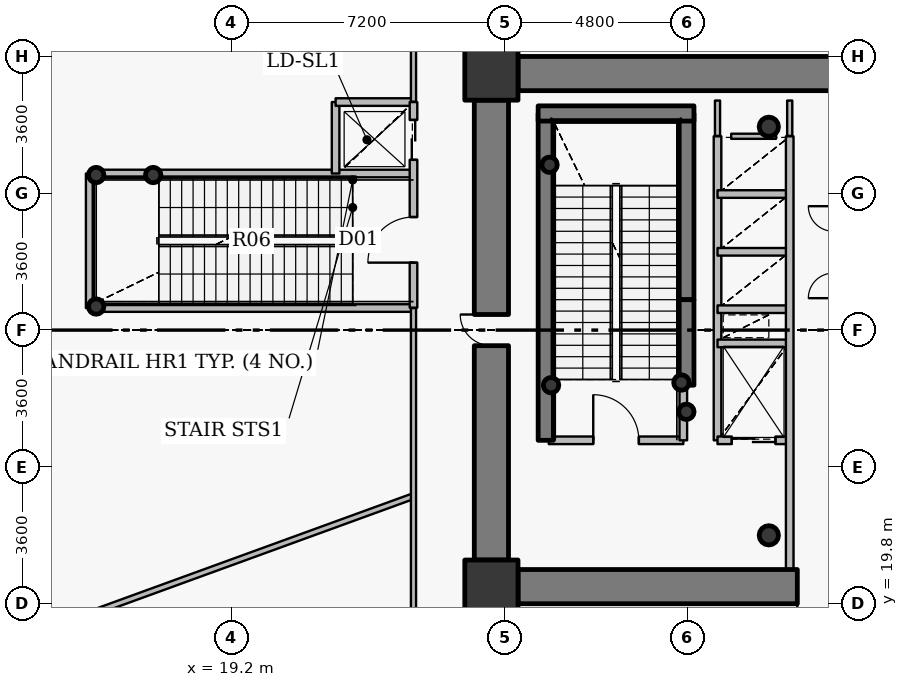
"""IFC4 building model, lengths in metres.
Left out: names, types, materials, properties, quantities, classifications, styles, units other than length and angle.
Written with IfcOpenShell. Run it as: python <this file> out.ifc"""

import sys

from ifc_helpers import new_model, si_unit, direction, frame, frame_2d, origin, origin_2d, place, context, subcontext, project, spatial, rectangle, hollow_circle, extrude, source, transform, mapped, element, fill, save


model = new_model("IFC4")
c1 = context("Model", 3, precision=1e-05, world=origin(), true_north=direction((0.0, 1.0)))
c2 = subcontext(c1, "Body", "Model", "MODEL_VIEW")
j1 = project(units=[si_unit("LENGTHUNIT", "METRE"), si_unit("PLANEANGLEUNIT", "RADIAN")], contexts=[c1])
p1 = place(None, origin())
s1 = spatial("IfcSite", under=j1, at=p1, CompositionType="ELEMENT")
p2 = place(p1, origin())
s2 = spatial("IfcBuilding", under=s1, at=p2, CompositionType="ELEMENT")
p3 = place(p2, frame((0.0, 0.0, 27.0)))
s3 = spatial("IfcBuildingStorey", under=s2, at=p3, CompositionType="ELEMENT", Elevation=27.0)
for number, where, z_axis, x_axis in (
    (1, (26.05, 20.25, 0.0), (0.0, 0.0, 1.0), (1.0, 0.0, 0.0)),
    (2, (26.05, 33.75, 0.0), (0.0, 0.0, 1.0), (1.0, 0.0, 0.0)),
):
    element("IfcColumn", number, at=place(p3, frame(where, z_axis=z_axis, x_axis=x_axis)), inside=s3, PredefinedType="COLUMN", context=c2, shape_type="SweptSolid", body=[
        extrude(rectangle(XDim=1.4, YDim=1.4, at=origin_2d()), origin(), (0.0, 0.0, 1.0), 5.4),
    ])
for number, where, z_axis, x_axis in (
    (3, (33.35, 21.6, 0.0), (0.0, 0.0, 1.0), (1.0, 0.0, 0.0)),
    (4, (33.35, 32.35, 0.0), (0.0, 0.0, 1.0), (1.0, 0.0, 0.0)),
):
    element("IfcColumn", number, at=place(p3, frame(where, z_axis=z_axis, x_axis=x_axis)), inside=s3, PredefinedType="COLUMN", context=c2, shape_type="SweptSolid", body=[
        extrude(hollow_circle(Radius=0.254, WallThickness=0.02, at=origin_2d()), origin(), (0.0, 0.0, 1.0), 5.4),
    ])
p4 = place(p3, frame((27.48, 24.1, 0.0), z_axis=(0.0, 0.0, 1.0), x_axis=(0.0, 1.0, 0.0)))
e5 = element("IfcWall", 5, at=p4, inside=s3, PredefinedType="SHEAR", context=c2, shape_type="SweptSolid", body=[
    extrude(rectangle(XDim=8.6, YDim=0.4, at=frame_2d((4.3, 0.0))), origin(), (0.0, 0.0, 1.0), 5.4),
])
p5 = place(p3, frame((31.18, 27.8, 0.0), z_axis=(0.0, 0.0, 1.0), x_axis=(0.0, 1.0, 0.0)))
e6 = element("IfcWall", 6, at=p5, inside=s3, PredefinedType="SHEAR", context=c2, shape_type="SweptSolid", body=[
    extrude(rectangle(XDim=4.9, YDim=0.4, at=frame_2d((2.45, 0.0))), origin(), (0.0, 0.0, 1.0), 5.4),
])
p6 = place(p3, frame((27.28, 32.7, 0.0), z_axis=(0.0, 0.0, 1.0), x_axis=(1.0, 0.0, 0.0)))
e7 = element("IfcWall", 7, at=p6, inside=s3, PredefinedType="SHEAR", context=c2, shape_type="SweptSolid", body=[
    extrude(rectangle(XDim=4.1, YDim=0.4, at=frame_2d((2.05, 0.0))), origin(), (0.0, 0.0, 1.0), 5.4),
])
for number, where, z_axis, x_axis in (
    (8, (27.58, 31.35, 0.0), (0.0, 0.0, 1.0), (1.0, 0.0, 0.0)),
    (9, (31.05, 25.62, 0.0), (0.0, 0.0, 1.0), (1.0, 0.0, 0.0)),
    (10, (31.18, 24.85, 0.0), (0.0, 0.0, 1.0), (1.0, 0.0, 0.0)),
    (11, (27.62, 25.55, 0.0), (0.0, 0.0, 1.0), (1.0, 0.0, 0.0)),
    (12, (15.65, 27.62, 0.0), (0.0, 0.0, 1.0), (1.0, 0.0, 0.0)),
    (13, (15.65, 31.08, 0.0), (0.0, 0.0, 1.0), (1.0, 0.0, 0.0)),
    (14, (17.15, 31.08, 0.0), (0.0, 0.0, 1.0), (1.0, 0.0, 0.0)),
):
    element("IfcColumn", number, at=place(p3, frame(where, z_axis=z_axis, x_axis=x_axis)), inside=s3, PredefinedType="COLUMN", context=c2, shape_type="SweptSolid", body=[
        extrude(hollow_circle(Radius=0.203, WallThickness=0.016, at=origin_2d()), origin(), (0.0, 0.0, 1.0), 5.4),
    ])
p7 = place(p3, frame((26.75, 33.75, 0.0), z_axis=(0.0, 0.0, 1.0), x_axis=(1.0, 0.0, 0.0)))
e15 = element("IfcWall", 15, at=p7, inside=s3, PredefinedType="SHEAR", context=c2, shape_type="SweptSolid", body=[
    extrude(rectangle(XDim=18.5, YDim=0.9, at=frame_2d((9.25, 0.0))), origin(), (0.0, 0.0, 1.0), 4.6),
])
p8 = place(p3, frame((45.25, 20.25, 0.0), z_axis=(0.0, 0.0, 1.0), x_axis=(-1.0, 0.0, 0.0)))
e16 = element("IfcWall", 16, at=p8, inside=s3, PredefinedType="SHEAR", context=c2, shape_type="SweptSolid", body=[
    extrude(rectangle(XDim=18.5, YDim=0.9, at=frame_2d((9.25, 0.0))), origin(), (0.0, 0.0, 1.0), 4.6),
])
p9 = place(p8, frame((10.0, 0.0, 0.0)))
e17 = element("IfcOpeningElement", 17, at=p9, cuts=e16, PredefinedType="OPENING", context=c2, shape_type="SweptSolid", body=[
    extrude(rectangle(XDim=1.15, YDim=2.15, at=origin_2d()), frame((0.575, 0.46, 1.075), z_axis=(0.0, -1.0, 0.0), x_axis=(1.0, 0.0, 0.0)), (0.0, 0.0, 1.0), 0.92),
])
p10 = place(p3, frame((26.05, 20.95, 0.0), z_axis=(0.0, 0.0, 1.0), x_axis=(0.0, 1.0, 0.0)))
e18 = element("IfcWall", 18, at=p10, inside=s3, PredefinedType="SHEAR", context=c2, shape_type="SweptSolid", body=[
    extrude(rectangle(XDim=12.1, YDim=0.9, at=frame_2d((6.05, 0.0))), origin(), (0.0, 0.0, 1.0), 4.6),
])
p11 = place(p10, frame((5.64, 0.0, 0.0)))
e19 = element("IfcOpeningElement", 19, at=p11, cuts=e18, PredefinedType="OPENING", context=c2, shape_type="SweptSolid", body=[
    extrude(rectangle(XDim=0.82, YDim=2.1, at=origin_2d()), frame((0.41, 0.46, 1.05), z_axis=(0.0, -1.0, 0.0), x_axis=(1.0, 0.0, 0.0)), (0.0, 0.0, 1.0), 0.92),
])
p12 = place(p3, frame((31.18, 25.55, 0.0), z_axis=(0.0, 0.0, 1.0), x_axis=(0.0, 1.0, 0.0)))
e20 = element("IfcWall", 20, at=p12, inside=s3, PredefinedType="SHEAR", context=c2, shape_type="SweptSolid", body=[
    extrude(rectangle(XDim=2.25, YDim=0.4, at=frame_2d((1.125, 0.0))), origin(), (0.0, 0.0, 1.0), 4.75),
])
p13 = place(p3, frame((13.753, 18.903, 0.0), z_axis=(0.0, 0.0, 1.0), x_axis=(0.939694021803, 0.342016294038, 0.0)))
e21 = element("IfcWall", 21, at=p13, inside=s3, PredefinedType="PARTITIONING", context=c2, shape_type="SweptSolid", body=[
    extrude(rectangle(XDim=10.905, YDim=0.15, at=frame_2d((5.452, 0.0))), origin(), (0.0, 0.0, 1.0), 5.15),
])
p14 = place(p3, frame((15.48, 27.58, 0.0), z_axis=(0.0, 0.0, 1.0), x_axis=(0.0, 1.0, 0.0)))
e22 = element("IfcWall", 22, at=p14, inside=s3, PredefinedType="PARTITIONING", context=c2, shape_type="SweptSolid", body=[
    extrude(rectangle(XDim=3.54, YDim=0.2, at=frame_2d((1.77, 0.0))), origin(), (0.0, 0.0, 1.0), 5.15),
])
for number, where, z_axis, x_axis in (
    (23, (15.48, 27.58, 0.0), (0.0, 0.0, 1.0), (1.0, 0.0, 0.0)),
    (24, (15.48, 31.12, 0.0), (0.0, 0.0, 1.0), (1.0, 0.0, 0.0)),
):
    element("IfcWall", number, at=place(p3, frame(where, z_axis=z_axis, x_axis=x_axis)), inside=s3, PredefinedType="PARTITIONING", context=c2, shape_type="SweptSolid", body=[
        extrude(rectangle(XDim=8.52, YDim=0.2, at=frame_2d((4.26, 0.0))), origin(), (0.0, 0.0, 1.0), 5.15),
    ])
p15 = place(p3, frame((21.95, 31.12, 0.0), z_axis=(0.0, 0.0, 1.0), x_axis=(0.0, 1.0, 0.0)))
e25 = element("IfcWall", 25, at=p15, inside=s3, PredefinedType="PARTITIONING", context=c2, shape_type="SweptSolid", body=[
    extrude(rectangle(XDim=1.88, YDim=0.2, at=frame_2d((0.94, 0.0))), origin(), (0.0, 0.0, 1.0), 3.185),
])
p16 = place(p3, frame((21.95, 33.0, 0.0), z_axis=(0.0, 0.0, 1.0), x_axis=(1.0, 0.0, 0.0)))
e26 = element("IfcWall", 26, at=p16, inside=s3, PredefinedType="PARTITIONING", context=c2, shape_type="SweptSolid", body=[
    extrude(rectangle(XDim=2.05, YDim=0.2, at=frame_2d((1.025, 0.0))), origin(), (0.0, 0.0, 1.0), 5.15),
])
p17 = place(p3, frame((24.0, 14.8, 0.0), z_axis=(0.0, 0.0, 1.0), x_axis=(0.0, 1.0, 0.0)))
e27 = element("IfcWall", 27, at=p17, inside=s3, PredefinedType="PARTITIONING", context=c2, shape_type="SweptSolid", body=[
    extrude(rectangle(XDim=12.78, YDim=0.135, at=frame_2d((6.39, 0.0))), origin(), (0.0, 0.0, 1.0), 3.185),
])
p18 = place(p17, frame((3.411, 0.0, 0.0)))
e28 = element("IfcOpeningElement", 28, at=p18, cuts=e27, PredefinedType="OPENING", context=c2, shape_type="SweptSolid", body=[
    extrude(rectangle(XDim=1.05, YDim=2.15, at=origin_2d()), frame((0.525, 0.078, 1.075), z_axis=(0.0, -1.0, 0.0), x_axis=(1.0, 0.0, 0.0)), (0.0, 0.0, 1.0), 0.155),
])
p19 = place(p3, frame((24.0, 27.59, 0.0), z_axis=(0.0, 0.0, 1.0), x_axis=(0.0, 1.0, 0.0)))
e29 = element("IfcWall", 29, at=p19, inside=s3, PredefinedType="PARTITIONING", context=c2, shape_type="SweptSolid", body=[
    extrude(rectangle(XDim=5.41, YDim=0.2, at=frame_2d((2.705, 0.0))), origin(), (0.0, 0.0, 1.0), 3.185),
])
p20 = place(p19, frame((1.185, 0.0, 0.0)))
e30 = element("IfcOpeningElement", 30, at=p20, cuts=e29, PredefinedType="OPENING", context=c2, shape_type="SweptSolid", body=[
    extrude(rectangle(XDim=1.2, YDim=2.15, at=origin_2d()), frame((0.6, 0.11, 1.075), z_axis=(0.0, -1.0, 0.0), x_axis=(1.0, 0.0, 0.0)), (0.0, 0.0, 1.0), 0.22),
])
p21 = place(p19, frame((3.89, 0.0, 0.0)))
e31 = element("IfcOpeningElement", 31, at=p21, cuts=e29, PredefinedType="OPENING", context=c2, shape_type="SweptSolid", body=[
    extrude(rectangle(XDim=1.05, YDim=2.15, at=origin_2d()), frame((0.525, 0.11, 1.075), z_axis=(0.0, -1.0, 0.0), x_axis=(1.0, 0.0, 0.0)), (0.0, 0.0, 1.0), 0.22),
])
p22 = place(p3, frame((24.0, 33.01, 0.0), z_axis=(0.0, 0.0, 1.0), x_axis=(0.0, 1.0, 0.0)))
e32 = element("IfcWall", 32, at=p22, inside=s3, PredefinedType="PARTITIONING", context=c2, shape_type="SweptSolid", body=[
    extrude(rectangle(XDim=7.976, YDim=0.135, at=frame_2d((3.988, 0.0))), origin(), (0.0, 0.0, 1.0), 3.185),
])
p23 = place(p22, frame((3.463, 0.0, 0.0)))
e33 = element("IfcOpeningElement", 33, at=p23, cuts=e32, PredefinedType="OPENING", context=c2, shape_type="SweptSolid", body=[
    extrude(rectangle(XDim=1.05, YDim=2.15, at=origin_2d()), frame((0.525, 0.078, 1.075), z_axis=(0.0, -1.0, 0.0), x_axis=(1.0, 0.0, 0.0)), (0.0, 0.0, 1.0), 0.155),
])
p24 = place(p3, frame((27.56, 24.1, 0.0), z_axis=(0.0, 0.0, 1.0), x_axis=(1.0, 0.0, 0.0)))
e34 = element("IfcWall", 34, at=p24, inside=s3, PredefinedType="PARTITIONING", context=c2, shape_type="SweptSolid", body=[
    extrude(rectangle(XDim=3.54, YDim=0.2, at=frame_2d((1.77, 0.0))), origin(), (0.0, 0.0, 1.0), 5.15),
])
p25 = place(p24, frame((1.17, 0.0, 0.0)))
e35 = element("IfcOpeningElement", 35, at=p25, cuts=e34, PredefinedType="OPENING", context=c2, shape_type="SweptSolid", body=[
    extrude(rectangle(XDim=1.2, YDim=2.15, at=origin_2d()), frame((0.6, 0.11, 1.075), z_axis=(0.0, -1.0, 0.0), x_axis=(1.0, 0.0, 0.0)), (0.0, 0.0, 1.0), 0.22),
])
p26 = place(p3, frame((31.1, 24.1, 0.0), z_axis=(0.0, 0.0, 1.0), x_axis=(0.0, 1.0, 0.0)))
e36 = element("IfcWall", 36, at=p26, inside=s3, PredefinedType="PARTITIONING", context=c2, shape_type="SweptSolid", body=[
    extrude(rectangle(XDim=1.44, YDim=0.2, at=frame_2d((0.72, 0.0))), origin(), (0.0, 0.0, 1.0), 5.15),
])
p27 = place(p3, frame((32.0, 24.1, 0.0), z_axis=(0.0, 0.0, 1.0), x_axis=(0.0, 1.0, 0.0)))
e37 = element("IfcWall", 37, at=p27, inside=s3, PredefinedType="PARTITIONING", context=c2, shape_type="SweptSolid", body=[
    extrude(rectangle(XDim=8.0, YDim=0.2, at=frame_2d((4.0, 0.0))), origin(), (0.0, 0.0, 1.0), 5.15),
])
p28 = place(p3, frame((32.0, 24.1, 0.0), z_axis=(0.0, 0.0, 1.0), x_axis=(1.0, 0.0, 0.0)))
e38 = element("IfcWall", 38, at=p28, inside=s3, PredefinedType="PARTITIONING", context=c2, shape_type="SweptSolid", body=[
    extrude(rectangle(XDim=1.9, YDim=0.2, at=frame_2d((0.95, 0.0))), origin(), (0.0, 0.0, 1.0), 4.735),
])
p29 = place(p28, frame((0.375, 0.0, 0.0)))
e39 = element("IfcOpeningElement", 39, at=p29, cuts=e38, PredefinedType="OPENING", context=c2, shape_type="SweptSolid", body=[
    extrude(rectangle(XDim=1.15, YDim=2.15, at=origin_2d()), frame((0.575, 0.11, 1.075), z_axis=(0.0, -1.0, 0.0), x_axis=(1.0, 0.0, 0.0)), (0.0, 0.0, 1.0), 0.22),
])
for number, where, z_axis, x_axis in (
    (40, (32.0, 26.65, 0.0), (0.0, 0.0, 1.0), (1.0, 0.0, 0.0)),
    (41, (32.0, 27.55, 0.0), (0.0, 0.0, 1.0), (1.0, 0.0, 0.0)),
    (42, (32.0, 29.06, 0.0), (0.0, 0.0, 1.0), (1.0, 0.0, 0.0)),
    (43, (32.0, 30.58, 0.0), (0.0, 0.0, 1.0), (1.0, 0.0, 0.0)),
):
    element("IfcWall", number, at=place(p3, frame(where, z_axis=z_axis, x_axis=x_axis)), inside=s3, PredefinedType="PARTITIONING", context=c2, shape_type="SweptSolid", body=[
        extrude(rectangle(XDim=1.9, YDim=0.2, at=frame_2d((0.95, 0.0))), origin(), (0.0, 0.0, 1.0), 4.735),
    ])
p30 = place(p3, frame((33.9, 20.7, 0.0), z_axis=(0.0, 0.0, 1.0), x_axis=(0.0, 1.0, 0.0)))
e44 = element("IfcWall", 44, at=p30, inside=s3, PredefinedType="PARTITIONING", context=c2, shape_type="SweptSolid", body=[
    extrude(rectangle(XDim=11.4, YDim=0.2, at=frame_2d((5.7, 0.0))), origin(), (0.0, 0.0, 1.0), 4.735),
])
p31 = place(p3, frame((32.36, 32.1, 0.0), z_axis=(0.0, 0.0, 1.0), x_axis=(1.0, 0.0, 0.0)))
e45 = element("IfcWall", 45, at=p31, inside=s3, PredefinedType="PARTITIONING", context=c2, shape_type="SweptSolid", body=[
    extrude(rectangle(XDim=1.18, YDim=0.135, at=frame_2d((0.59, 0.0))), origin(), (0.0, 0.0, 1.0), 4.735),
])
p32 = place(p3, frame((32.0, 33.04, 0.0), z_axis=(0.0, 0.0, 1.0), x_axis=(0.0, -1.0, 0.0)))
e46 = element("IfcWall", 46, at=p32, inside=s3, PredefinedType="PARTITIONING", context=c2, shape_type="SweptSolid", body=[
    extrude(rectangle(XDim=0.93, YDim=0.135, at=frame_2d((0.465, 0.0))), origin(), (0.0, 0.0, 1.0), 4.685),
])
p33 = place(p3, frame((33.9, 32.11, 0.0), z_axis=(0.0, 0.0, 1.0), x_axis=(0.0, 1.0, 0.0)))
e47 = element("IfcWall", 47, at=p33, inside=s3, PredefinedType="PARTITIONING", context=c2, shape_type="SweptSolid", body=[
    extrude(rectangle(XDim=0.93, YDim=0.135, at=frame_2d((0.465, 0.0))), origin(), (0.0, 0.0, 1.0), 4.735),
])
p34 = place(p3, frame((25.95, 38.893, 0.0), z_axis=(0.0, 0.0, 1.0), x_axis=(0.0, -1.0, 0.0)))
e48 = element("IfcWall", 48, at=p34, inside=s3, PredefinedType="PARTITIONING", context=c2, shape_type="SweptSolid", body=[
    extrude(rectangle(XDim=4.693, YDim=0.135, at=frame_2d((2.346, 0.0))), origin(), (0.0, 0.0, 1.0), 3.185),
])
for number, where, z_axis, x_axis in (
    (49, (25.6, 34.2, 0.0), (0.0, 0.0, 1.0), (0.0, -1.0, 0.0)),
    (50, (25.6, 20.94, 0.0), (0.0, 0.0, 1.0), (0.0, -1.0, 0.0)),
):
    element("IfcWall", number, at=place(p3, frame(where, z_axis=z_axis, x_axis=x_axis)), inside=s3, PredefinedType="PARTITIONING", context=c2, shape_type="SweptSolid", body=[
        extrude(rectangle(XDim=1.14, YDim=0.135, at=frame_2d((0.57, 0.0))), origin(), (0.0, 0.0, 1.0), 5.15),
    ])
p35 = place(p3, frame((25.907, 19.8, 0.0), z_axis=(0.0, 0.0, 1.0), x_axis=(1.0, 0.0, 0.0)))
e51 = element("IfcWall", 51, at=p35, inside=s3, PredefinedType="PARTITIONING", context=c2, shape_type="SweptSolid", body=[
    extrude(rectangle(XDim=0.833, YDim=0.135, at=frame_2d((0.416, 0.0))), origin(), (0.0, 0.0, 1.0), 3.185),
])
m1 = source(origin(), c2, "Body", "SweptSolid", [
    extrude(rectangle(XDim=0.82, YDim=2.1, at=origin_2d()), frame((0.41, 0.025, 1.05), z_axis=(0.0, -1.0, 0.0), x_axis=(1.0, 0.0, 0.0)), (0.0, 0.0, 1.0), 0.05),
])
p36 = place(p11, origin())
e52 = element("IfcDoor", 52, at=p36, inside=s3, OperationType="SINGLE_SWING_RIGHT", PredefinedType="DOOR", context=c2, shape_type="MappedRepresentation", body=[
    mapped(m1, transform((0.0, 0.0, 0.0), x_axis=(1.0, 0.0, 0.0), y_axis=(0.0, 1.0, 0.0), z_axis=(0.0, 0.0, 1.0), scale=1.0)),
])
fill(e19, e52)
m2 = source(origin(), c2, "Body", "SweptSolid", [
    extrude(rectangle(XDim=1.15, YDim=2.15, at=origin_2d()), frame((0.575, 0.025, 1.075), z_axis=(0.0, -1.0, 0.0), x_axis=(1.0, 0.0, 0.0)), (0.0, 0.0, 1.0), 0.05),
])
p37 = place(p9, origin())
e53 = element("IfcDoor", 53, at=p37, inside=s3, OperationType="SINGLE_SWING_RIGHT", PredefinedType="DOOR", context=c2, shape_type="MappedRepresentation", body=[
    mapped(m2, transform((0.0, 0.0, 0.0), x_axis=(1.0, 0.0, 0.0), y_axis=(0.0, 1.0, 0.0), z_axis=(0.0, 0.0, 1.0), scale=1.0)),
])
fill(e17, e53)
m3 = source(origin(), c2, "Body", "SweptSolid", [
    extrude(rectangle(XDim=1.2, YDim=2.15, at=origin_2d()), frame((0.6, 0.025, 1.075), z_axis=(0.0, -1.0, 0.0), x_axis=(1.0, 0.0, 0.0)), (0.0, 0.0, 1.0), 0.05),
])
p38 = place(p25, origin())
e54 = element("IfcDoor", 54, at=p38, inside=s3, OperationType="SINGLE_SWING_LEFT", PredefinedType="DOOR", context=c2, shape_type="MappedRepresentation", body=[
    mapped(m3, transform((0.0, 0.0, 0.0), x_axis=(1.0, 0.0, 0.0), y_axis=(0.0, 1.0, 0.0), z_axis=(0.0, 0.0, 1.0), scale=1.0)),
])
fill(e35, e54)
p39 = place(p20, origin())
e55 = element("IfcDoor", 55, at=p39, inside=s3, OperationType="SINGLE_SWING_LEFT", PredefinedType="DOOR", context=c2, shape_type="MappedRepresentation", body=[
    mapped(m3, transform((0.0, 0.0, 0.0), x_axis=(1.0, 0.0, 0.0), y_axis=(0.0, 1.0, 0.0), z_axis=(0.0, 0.0, 1.0), scale=1.0)),
])
fill(e30, e55)
m4 = source(origin(), c2, "Body", "SweptSolid", [
    extrude(rectangle(XDim=1.15, YDim=2.15, at=origin_2d()), frame((0.575, 0.025, 1.075), z_axis=(0.0, -1.0, 0.0), x_axis=(1.0, 0.0, 0.0)), (0.0, 0.0, 1.0), 0.05),
])
p40 = place(p29, origin())
e56 = element("IfcDoor", 56, at=p40, inside=s3, OperationType="DOUBLE_DOOR_SLIDING", PredefinedType="USERDEFINED", context=c2, shape_type="MappedRepresentation", body=[
    mapped(m4, transform((0.0, 0.0, 0.0), x_axis=(1.0, 0.0, 0.0), y_axis=(0.0, 1.0, 0.0), z_axis=(0.0, 0.0, 1.0), scale=1.0)),
])
fill(e39, e56)
m5 = source(origin(), c2, "Body", "SweptSolid", [
    extrude(rectangle(XDim=1.05, YDim=2.15, at=origin_2d()), frame((0.525, 0.025, 1.075), z_axis=(0.0, -1.0, 0.0), x_axis=(1.0, 0.0, 0.0)), (0.0, 0.0, 1.0), 0.05),
])
p41 = place(p21, origin())
e57 = element("IfcDoor", 57, at=p41, inside=s3, OperationType="DOUBLE_DOOR_SLIDING", PredefinedType="USERDEFINED", context=c2, shape_type="MappedRepresentation", body=[
    mapped(m5, transform((0.0, 0.0, 0.0), x_axis=(1.0, 0.0, 0.0), y_axis=(0.0, 1.0, 0.0), z_axis=(0.0, 0.0, 1.0), scale=1.0)),
])
fill(e31, e57)
save(model, sys.argv[1])
